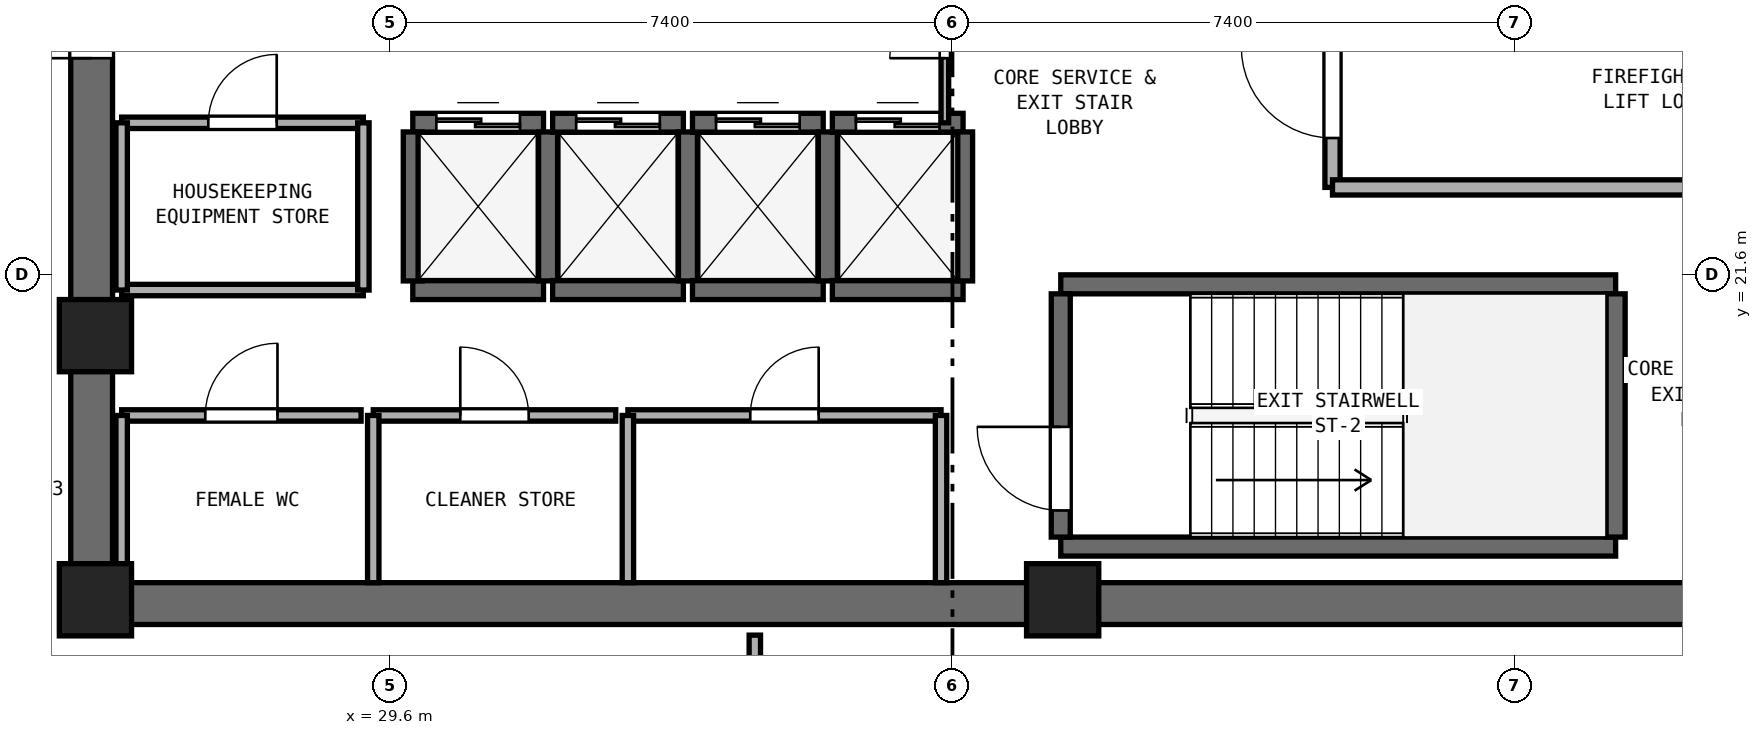
"""IFC4 building model, lengths in metres.
Left out: names, types, materials, properties, quantities, classifications, styles, units other than length and angle.
Written with IfcOpenShell. Run it as: python <this file> out.ifc"""

import sys

from ifc_helpers import new_model, si_unit, direction, frame, frame_2d, origin, origin_2d, place, context, subcontext, project, spatial, rectangle, extrude, element, fill, save


model = new_model("IFC4")
c1 = context("Model", 3, precision=1e-05, world=origin(), true_north=direction((0.0, 1.0)))
c2 = subcontext(c1, "Body", "Model", "MODEL_VIEW")
j1 = project(units=[si_unit("LENGTHUNIT", "METRE"), si_unit("PLANEANGLEUNIT", "RADIAN")], contexts=[c1])
p1 = place(None, origin())
s1 = spatial("IfcSite", under=j1, at=p1, CompositionType="ELEMENT")
p2 = place(p1, origin())
s2 = spatial("IfcBuilding", under=s1, at=p2, CompositionType="ELEMENT")
p3 = place(p2, frame((0.0, 0.0, 204.8)))
s3 = spatial("IfcBuildingStorey", under=s2, at=p3, CompositionType="ELEMENT", Elevation=204.8)
p4 = place(p3, frame((25.4, 17.275, 0.0), z_axis=(0.0, 0.0, 1.0), x_axis=(1.0, 0.0, 0.0)))
e1 = element("IfcWall", 1, at=p4, inside=s3, PredefinedType="SHEAR", context=c2, shape_type="SweptSolid", body=[
    extrude(rectangle(XDim=23.2, YDim=0.55, at=frame_2d((11.6, 0.0))), origin(), (0.0, 0.0, 1.0), 3.54),
])
p5 = place(p3, frame((25.675, 17.55, 0.0), z_axis=(0.0, 0.0, 1.0), x_axis=(0.0, 1.0, 0.0)))
e2 = element("IfcWall", 2, at=p5, inside=s3, PredefinedType="SHEAR", context=c2, shape_type="SweptSolid", body=[
    extrude(rectangle(XDim=15.3, YDim=0.55, at=frame_2d((7.65, 0.0))), origin(), (0.0, 0.0, 1.0), 3.54),
])
p6 = place(p5, frame((6.9, 0.0, 0.0)))
e3 = element("IfcOpeningElement", 3, at=p6, cuts=e2, PredefinedType="OPENING", context=c2, shape_type="SweptSolid", body=[
    extrude(rectangle(XDim=1.5, YDim=2.15, at=frame_2d((0.75, 1.075))), frame((0.0, 0.285, 0.0), z_axis=(0.0, -1.0, 0.0), x_axis=(1.0, 0.0, 0.0)), (0.0, 0.0, 1.0), 0.57),
])
for number, where, z_axis, x_axis in (
    (4, (25.725, 17.325, 0.0), (0.0, 0.0, 1.0), (1.0, 0.0, 0.0)),
    (5, (38.45, 17.325, 0.0), (0.0, 0.0, 1.0), (1.0, 0.0, 0.0)),
    (6, (25.725, 20.8, 0.0), (0.0, 0.0, 1.0), (1.0, 0.0, 0.0)),
):
    element("IfcColumn", number, at=place(p3, frame(where, z_axis=z_axis, x_axis=x_axis)), inside=s3, PredefinedType="PILASTER", context=c2, shape_type="SweptSolid", body=[
        extrude(rectangle(XDim=0.95, YDim=0.95, at=origin_2d()), origin(), (0.0, 0.0, 1.0), 3.8),
    ])
for number, where, z_axis, x_axis in (
    (7, (38.425, 18.025, 0.0), (0.0, 0.0, 1.0), (1.0, 0.0, 0.0)),
    (8, (38.425, 21.475, 0.0), (0.0, 0.0, 1.0), (1.0, 0.0, 0.0)),
):
    element("IfcWall", number, at=place(p3, frame(where, z_axis=z_axis, x_axis=x_axis)), inside=s3, PredefinedType="SHEAR", context=c2, shape_type="SweptSolid", body=[
        extrude(rectangle(XDim=7.3, YDim=0.25, at=frame_2d((3.65, 0.0))), origin(), (0.0, 0.0, 1.0), 3.54),
    ])
p7 = place(p3, frame((38.425, 18.15, 0.0), z_axis=(0.0, 0.0, 1.0), x_axis=(0.0, 1.0, 0.0)))
e9 = element("IfcWall", 9, at=p7, inside=s3, PredefinedType="SHEAR", context=c2, shape_type="SweptSolid", body=[
    extrude(rectangle(XDim=3.2, YDim=0.25, at=frame_2d((1.6, 0.0))), origin(), (0.0, 0.0, 1.0), 3.54),
])
p8 = place(p7, frame((0.35, 0.0, 0.0)))
e10 = element("IfcOpeningElement", 10, at=p8, cuts=e9, PredefinedType="OPENING", context=c2, shape_type="SweptSolid", body=[
    extrude(rectangle(XDim=1.1, YDim=2.15, at=frame_2d((0.55, 1.075))), frame((0.0, 0.135, 0.0), z_axis=(0.0, -1.0, 0.0), x_axis=(1.0, 0.0, 0.0)), (0.0, 0.0, 1.0), 0.27),
])
p9 = place(p3, frame((45.725, 18.15, 0.0), z_axis=(0.0, 0.0, 1.0), x_axis=(0.0, 1.0, 0.0)))
e11 = element("IfcWall", 11, at=p9, inside=s3, PredefinedType="SHEAR", context=c2, shape_type="SweptSolid", body=[
    extrude(rectangle(XDim=3.2, YDim=0.25, at=frame_2d((1.6, 0.0))), origin(), (0.0, 0.0, 1.0), 3.54),
])
p10 = place(p3, frame((29.9, 21.4, 0.0), z_axis=(0.0, 0.0, 1.0), x_axis=(1.0, 0.0, 0.0)))
e12 = element("IfcWall", 12, at=p10, inside=s3, PredefinedType="SHEAR", context=c2, shape_type="SweptSolid", body=[
    extrude(rectangle(XDim=1.72, YDim=0.25, at=frame_2d((0.86, 0.0))), origin(), (0.0, 0.0, 1.0), 3.54),
])
p11 = place(p3, frame((29.9, 23.6, 0.0), z_axis=(0.0, 0.0, 1.0), x_axis=(1.0, 0.0, 0.0)))
e13 = element("IfcWall", 13, at=p11, inside=s3, PredefinedType="SHEAR", context=c2, shape_type="SweptSolid", body=[
    extrude(rectangle(XDim=1.72, YDim=0.25, at=frame_2d((0.86, 0.0))), origin(), (0.0, 0.0, 1.0), 3.54),
])
p12 = place(p11, frame((0.31, 0.0, 0.0)))
e14 = element("IfcOpeningElement", 14, at=p12, cuts=e13, PredefinedType="OPENING", context=c2, shape_type="SweptSolid", body=[
    extrude(rectangle(XDim=1.1, YDim=2.15, at=frame_2d((0.55, 1.075))), frame((0.0, 0.135, 0.0), z_axis=(0.0, -1.0, 0.0), x_axis=(1.0, 0.0, 0.0)), (0.0, 0.0, 1.0), 0.27),
])
for number, where, z_axis, x_axis in (
    (15, (29.9, 21.52, 0.0), (0.0, 0.0, 1.0), (0.0, 1.0, 0.0)),
    (16, (31.68, 21.52, 0.0), (0.0, 0.0, 1.0), (0.0, 1.0, 0.0)),
):
    element("IfcWall", number, at=place(p3, frame(where, z_axis=z_axis, x_axis=x_axis)), inside=s3, PredefinedType="SHEAR", context=c2, shape_type="SweptSolid", body=[
        extrude(rectangle(XDim=1.96, YDim=0.25, at=frame_2d((0.98, 0.0))), origin(), (0.0, 0.0, 1.0), 3.54),
    ])
p13 = place(p3, frame((31.74, 21.4, 0.0), z_axis=(0.0, 0.0, 1.0), x_axis=(1.0, 0.0, 0.0)))
e17 = element("IfcWall", 17, at=p13, inside=s3, PredefinedType="SHEAR", context=c2, shape_type="SweptSolid", body=[
    extrude(rectangle(XDim=1.72, YDim=0.25, at=frame_2d((0.86, 0.0))), origin(), (0.0, 0.0, 1.0), 3.54),
])
p14 = place(p3, frame((31.74, 23.6, 0.0), z_axis=(0.0, 0.0, 1.0), x_axis=(1.0, 0.0, 0.0)))
e18 = element("IfcWall", 18, at=p14, inside=s3, PredefinedType="SHEAR", context=c2, shape_type="SweptSolid", body=[
    extrude(rectangle(XDim=1.72, YDim=0.25, at=frame_2d((0.86, 0.0))), origin(), (0.0, 0.0, 1.0), 3.54),
])
p15 = place(p14, frame((0.31, 0.0, 0.0)))
e19 = element("IfcOpeningElement", 19, at=p15, cuts=e18, PredefinedType="OPENING", context=c2, shape_type="SweptSolid", body=[
    extrude(rectangle(XDim=1.1, YDim=2.15, at=frame_2d((0.55, 1.075))), frame((0.0, 0.135, 0.0), z_axis=(0.0, -1.0, 0.0), x_axis=(1.0, 0.0, 0.0)), (0.0, 0.0, 1.0), 0.27),
])
p16 = place(p3, frame((33.52, 21.52, 0.0), z_axis=(0.0, 0.0, 1.0), x_axis=(0.0, 1.0, 0.0)))
e20 = element("IfcWall", 20, at=p16, inside=s3, PredefinedType="SHEAR", context=c2, shape_type="SweptSolid", body=[
    extrude(rectangle(XDim=1.96, YDim=0.25, at=frame_2d((0.98, 0.0))), origin(), (0.0, 0.0, 1.0), 3.54),
])
p17 = place(p3, frame((33.58, 21.4, 0.0), z_axis=(0.0, 0.0, 1.0), x_axis=(1.0, 0.0, 0.0)))
e21 = element("IfcWall", 21, at=p17, inside=s3, PredefinedType="SHEAR", context=c2, shape_type="SweptSolid", body=[
    extrude(rectangle(XDim=1.72, YDim=0.25, at=frame_2d((0.86, 0.0))), origin(), (0.0, 0.0, 1.0), 3.54),
])
p18 = place(p3, frame((33.58, 23.6, 0.0), z_axis=(0.0, 0.0, 1.0), x_axis=(1.0, 0.0, 0.0)))
e22 = element("IfcWall", 22, at=p18, inside=s3, PredefinedType="SHEAR", context=c2, shape_type="SweptSolid", body=[
    extrude(rectangle(XDim=1.72, YDim=0.25, at=frame_2d((0.86, 0.0))), origin(), (0.0, 0.0, 1.0), 3.54),
])
p19 = place(p18, frame((0.31, 0.0, 0.0)))
e23 = element("IfcOpeningElement", 23, at=p19, cuts=e22, PredefinedType="OPENING", context=c2, shape_type="SweptSolid", body=[
    extrude(rectangle(XDim=1.1, YDim=2.15, at=frame_2d((0.55, 1.075))), frame((0.0, 0.135, 0.0), z_axis=(0.0, -1.0, 0.0), x_axis=(1.0, 0.0, 0.0)), (0.0, 0.0, 1.0), 0.27),
])
p20 = place(p3, frame((35.36, 21.52, 0.0), z_axis=(0.0, 0.0, 1.0), x_axis=(0.0, 1.0, 0.0)))
e24 = element("IfcWall", 24, at=p20, inside=s3, PredefinedType="SHEAR", context=c2, shape_type="SweptSolid", body=[
    extrude(rectangle(XDim=1.96, YDim=0.25, at=frame_2d((0.98, 0.0))), origin(), (0.0, 0.0, 1.0), 3.54),
])
p21 = place(p3, frame((35.42, 21.4, 0.0), z_axis=(0.0, 0.0, 1.0), x_axis=(1.0, 0.0, 0.0)))
e25 = element("IfcWall", 25, at=p21, inside=s3, PredefinedType="SHEAR", context=c2, shape_type="SweptSolid", body=[
    extrude(rectangle(XDim=1.72, YDim=0.25, at=frame_2d((0.86, 0.0))), origin(), (0.0, 0.0, 1.0), 3.54),
])
p22 = place(p3, frame((35.42, 23.6, 0.0), z_axis=(0.0, 0.0, 1.0), x_axis=(1.0, 0.0, 0.0)))
e26 = element("IfcWall", 26, at=p22, inside=s3, PredefinedType="SHEAR", context=c2, shape_type="SweptSolid", body=[
    extrude(rectangle(XDim=1.72, YDim=0.25, at=frame_2d((0.86, 0.0))), origin(), (0.0, 0.0, 1.0), 3.54),
])
p23 = place(p22, frame((0.31, 0.0, 0.0)))
e27 = element("IfcOpeningElement", 27, at=p23, cuts=e26, PredefinedType="OPENING", context=c2, shape_type="SweptSolid", body=[
    extrude(rectangle(XDim=1.1, YDim=2.15, at=frame_2d((0.55, 1.075))), frame((0.0, 0.135, 0.0), z_axis=(0.0, -1.0, 0.0), x_axis=(1.0, 0.0, 0.0)), (0.0, 0.0, 1.0), 0.27),
])
p24 = place(p3, frame((37.14, 21.52, 0.0), z_axis=(0.0, 0.0, 1.0), x_axis=(0.0, 1.0, 0.0)))
e28 = element("IfcWall", 28, at=p24, inside=s3, PredefinedType="SHEAR", context=c2, shape_type="SweptSolid", body=[
    extrude(rectangle(XDim=1.96, YDim=0.25, at=frame_2d((0.98, 0.0))), origin(), (0.0, 0.0, 1.0), 3.54),
])
p25 = place(p3, frame((42.0, 22.75, 0.0), z_axis=(0.0, 0.0, 1.0), x_axis=(0.0, 1.0, 0.0)))
e29 = element("IfcWall", 29, at=p25, inside=s3, PredefinedType="SOLIDWALL", context=c2, shape_type="SweptSolid", body=[
    extrude(rectangle(XDim=6.05, YDim=0.2, at=frame_2d((3.025, 0.0))), origin(), (0.0, 0.0, 1.0), 3.54),
])
p26 = place(p25, frame((0.65, 0.0, 0.0)))
e30 = element("IfcOpeningElement", 30, at=p26, cuts=e29, PredefinedType="OPENING", context=c2, shape_type="SweptSolid", body=[
    extrude(rectangle(XDim=1.2, YDim=2.15, at=frame_2d((0.6, 1.075))), frame((0.0, 0.11, 0.0), z_axis=(0.0, -1.0, 0.0), x_axis=(1.0, 0.0, 0.0)), (0.0, 0.0, 1.0), 0.22),
])
p27 = place(p3, frame((42.0, 22.75, 0.0), z_axis=(0.0, 0.0, 1.0), x_axis=(1.0, 0.0, 0.0)))
e31 = element("IfcWall", 31, at=p27, inside=s3, PredefinedType="SOLIDWALL", context=c2, shape_type="SweptSolid", body=[
    extrude(rectangle(XDim=6.05, YDim=0.2, at=frame_2d((3.025, 0.0))), origin(), (0.0, 0.0, 1.0), 3.54),
])
p28 = place(p3, frame((26.07, 19.75, 0.0), z_axis=(0.0, 0.0, 1.0), x_axis=(1.0, 0.0, 0.0)))
e32 = element("IfcWall", 32, at=p28, inside=s3, PredefinedType="PARTITIONING", context=c2, shape_type="SweptSolid", body=[
    extrude(rectangle(XDim=3.15, YDim=0.15, at=frame_2d((1.575, 0.0))), origin(), (0.0, 0.0, 1.0), 3.54),
])
p29 = place(p28, frame((1.1, 0.0, 0.0)))
e33 = element("IfcOpeningElement", 33, at=p29, cuts=e32, PredefinedType="OPENING", context=c2, shape_type="SweptSolid", body=[
    extrude(rectangle(XDim=0.95, YDim=2.1, at=frame_2d((0.475, 1.05))), frame((0.0, 0.085, 0.0), z_axis=(0.0, -1.0, 0.0), x_axis=(1.0, 0.0, 0.0)), (0.0, 0.0, 1.0), 0.17),
])
p30 = place(p3, frame((26.07, 17.55, 0.0), z_axis=(0.0, 0.0, 1.0), x_axis=(0.0, 1.0, 0.0)))
e34 = element("IfcWall", 34, at=p30, inside=s3, PredefinedType="PARTITIONING", context=c2, shape_type="SweptSolid", body=[
    extrude(rectangle(XDim=2.2, YDim=0.15, at=frame_2d((1.1, 0.0))), origin(), (0.0, 0.0, 1.0), 2.64),
])
p31 = place(p3, frame((29.38, 19.75, 0.0), z_axis=(0.0, 0.0, 1.0), x_axis=(1.0, 0.0, 0.0)))
e35 = element("IfcWall", 35, at=p31, inside=s3, PredefinedType="PARTITIONING", context=c2, shape_type="SweptSolid", body=[
    extrude(rectangle(XDim=3.19, YDim=0.15, at=frame_2d((1.595, 0.0))), origin(), (0.0, 0.0, 1.0), 3.54),
])
p32 = place(p31, frame((1.145, 0.0, 0.0)))
e36 = element("IfcOpeningElement", 36, at=p32, cuts=e35, PredefinedType="OPENING", context=c2, shape_type="SweptSolid", body=[
    extrude(rectangle(XDim=0.9, YDim=2.1, at=frame_2d((0.45, 1.05))), frame((0.0, 0.085, 0.0), z_axis=(0.0, -1.0, 0.0), x_axis=(1.0, 0.0, 0.0)), (0.0, 0.0, 1.0), 0.17),
])
p33 = place(p3, frame((29.38, 17.55, 0.0), z_axis=(0.0, 0.0, 1.0), x_axis=(0.0, 1.0, 0.0)))
e37 = element("IfcWall", 37, at=p33, inside=s3, PredefinedType="PARTITIONING", context=c2, shape_type="SweptSolid", body=[
    extrude(rectangle(XDim=2.2, YDim=0.15, at=frame_2d((1.1, 0.0))), origin(), (0.0, 0.0, 1.0), 3.54),
])
p34 = place(p3, frame((32.73, 19.75, 0.0), z_axis=(0.0, 0.0, 1.0), x_axis=(1.0, 0.0, 0.0)))
e38 = element("IfcWall", 38, at=p34, inside=s3, PredefinedType="PARTITIONING", context=c2, shape_type="SweptSolid", body=[
    extrude(rectangle(XDim=4.12, YDim=0.15, at=frame_2d((2.06, 0.0))), origin(), (0.0, 0.0, 1.0), 3.54),
])
p35 = place(p34, frame((1.61, 0.0, 0.0)))
e39 = element("IfcOpeningElement", 39, at=p35, cuts=e38, PredefinedType="OPENING", context=c2, shape_type="SweptSolid", body=[
    extrude(rectangle(XDim=0.9, YDim=2.1, at=frame_2d((0.45, 1.05))), frame((0.0, 0.085, 0.0), z_axis=(0.0, -1.0, 0.0), x_axis=(1.0, 0.0, 0.0)), (0.0, 0.0, 1.0), 0.17),
])
for number, where, z_axis, x_axis in (
    (40, (32.73, 17.55, 0.0), (0.0, 0.0, 1.0), (0.0, 1.0, 0.0)),
    (41, (36.85, 17.55, 0.0), (0.0, 0.0, 1.0), (0.0, 1.0, 0.0)),
):
    element("IfcWall", number, at=place(p3, frame(where, z_axis=z_axis, x_axis=x_axis)), inside=s3, PredefinedType="PARTITIONING", context=c2, shape_type="SweptSolid", body=[
        extrude(rectangle(XDim=2.2, YDim=0.15, at=frame_2d((1.1, 0.0))), origin(), (0.0, 0.0, 1.0), 3.54),
    ])
p36 = place(p3, frame((26.07, 21.4, 0.0), z_axis=(0.0, 0.0, 1.0), x_axis=(1.0, 0.0, 0.0)))
e42 = element("IfcWall", 42, at=p36, inside=s3, PredefinedType="PARTITIONING", context=c2, shape_type="SweptSolid", body=[
    extrude(rectangle(XDim=3.18, YDim=0.15, at=frame_2d((1.59, 0.0))), origin(), (0.0, 0.0, 1.0), 3.54),
])
p37 = place(p3, frame((26.07, 23.6, 0.0), z_axis=(0.0, 0.0, 1.0), x_axis=(1.0, 0.0, 0.0)))
e43 = element("IfcWall", 43, at=p37, inside=s3, PredefinedType="PARTITIONING", context=c2, shape_type="SweptSolid", body=[
    extrude(rectangle(XDim=3.18, YDim=0.15, at=frame_2d((1.59, 0.0))), origin(), (0.0, 0.0, 1.0), 3.54),
])
p38 = place(p37, frame((1.14, 0.0, 0.0)))
e44 = element("IfcOpeningElement", 44, at=p38, cuts=e43, PredefinedType="OPENING", context=c2, shape_type="SweptSolid", body=[
    extrude(rectangle(XDim=0.9, YDim=2.1, at=frame_2d((0.45, 1.05))), frame((0.0, 0.085, 0.0), z_axis=(0.0, -1.0, 0.0), x_axis=(1.0, 0.0, 0.0)), (0.0, 0.0, 1.0), 0.17),
])
p39 = place(p3, frame((26.07, 21.4, 0.0), z_axis=(0.0, 0.0, 1.0), x_axis=(0.0, 1.0, 0.0)))
e45 = element("IfcWall", 45, at=p39, inside=s3, PredefinedType="PARTITIONING", context=c2, shape_type="SweptSolid", body=[
    extrude(rectangle(XDim=2.2, YDim=0.15, at=frame_2d((1.1, 0.0))), origin(), (0.0, 0.0, 1.0), 2.64),
])
p40 = place(p3, frame((29.25, 21.4, 0.0), z_axis=(0.0, 0.0, 1.0), x_axis=(0.0, 1.0, 0.0)))
e46 = element("IfcWall", 46, at=p40, inside=s3, PredefinedType="PARTITIONING", context=c2, shape_type="SweptSolid", body=[
    extrude(rectangle(XDim=2.2, YDim=0.15, at=frame_2d((1.1, 0.0))), origin(), (0.0, 0.0, 1.0), 3.54),
])
p41 = place(p3, frame((36.9, 23.6, 0.0), z_axis=(0.0, 0.0, 1.0), x_axis=(0.0, 1.0, 0.0)))
e47 = element("IfcWall", 47, at=p41, inside=s3, PredefinedType="PARTITIONING", context=c2, shape_type="SweptSolid", body=[
    extrude(rectangle(XDim=3.2, YDim=0.1, at=frame_2d((1.6, 0.0))), origin(), (0.0, 0.0, 1.0), 3.54),
])
p42 = place(p41, frame((0.85, 0.0, 0.0)))
e48 = element("IfcOpeningElement", 48, at=p42, cuts=e47, PredefinedType="OPENING", context=c2, shape_type="SweptSolid", body=[
    extrude(rectangle(XDim=1.45, YDim=2.12, at=frame_2d((0.725, 1.06))), frame((0.0, 0.06, 0.0), z_axis=(0.0, -1.0, 0.0), x_axis=(1.0, 0.0, 0.0)), (0.0, 0.0, 1.0), 0.12),
])
p43 = place(p3, frame((34.4, 15.35, 0.0), z_axis=(0.0, 0.0, 1.0), x_axis=(0.0, 1.0, 0.0)))
e49 = element("IfcWall", 49, at=p43, inside=s3, PredefinedType="PARTITIONING", context=c2, shape_type="SweptSolid", body=[
    extrude(rectangle(XDim=1.51, YDim=0.15, at=frame_2d((0.755, 0.0))), origin(), (0.0, 0.0, 1.0), 3.54),
])
p44 = place(p8, origin())
e50 = element("IfcDoor", 50, at=p44, inside=s3, OperationType="SINGLE_SWING_RIGHT", PredefinedType="DOOR", context=c2, shape_type="SweptSolid", body=[
    extrude(rectangle(XDim=1.1, YDim=2.15, at=frame_2d((0.55, 1.075))), frame((0.0, 0.025, 0.0), z_axis=(0.0, -1.0, 0.0), x_axis=(1.0, 0.0, 0.0)), (0.0, 0.0, 1.0), 0.05),
])
fill(e10, e50)
p45 = place(p12, origin())
e51 = element("IfcDoor", 51, at=p45, inside=s3, OperationType="DOUBLE_DOOR_SLIDING", PredefinedType="DOOR", context=c2, shape_type="SweptSolid", body=[
    extrude(rectangle(XDim=1.1, YDim=2.15, at=frame_2d((0.55, 1.075))), frame((0.0, 0.025, 0.0), z_axis=(0.0, -1.0, 0.0), x_axis=(1.0, 0.0, 0.0)), (0.0, 0.0, 1.0), 0.05),
])
fill(e14, e51)
p46 = place(p15, origin())
e52 = element("IfcDoor", 52, at=p46, inside=s3, OperationType="DOUBLE_DOOR_SLIDING", PredefinedType="DOOR", context=c2, shape_type="SweptSolid", body=[
    extrude(rectangle(XDim=1.1, YDim=2.15, at=frame_2d((0.55, 1.075))), frame((0.0, 0.025, 0.0), z_axis=(0.0, -1.0, 0.0), x_axis=(1.0, 0.0, 0.0)), (0.0, 0.0, 1.0), 0.05),
])
fill(e19, e52)
p47 = place(p19, origin())
e53 = element("IfcDoor", 53, at=p47, inside=s3, OperationType="DOUBLE_DOOR_SLIDING", PredefinedType="DOOR", context=c2, shape_type="SweptSolid", body=[
    extrude(rectangle(XDim=1.1, YDim=2.15, at=frame_2d((0.55, 1.075))), frame((0.0, 0.025, 0.0), z_axis=(0.0, -1.0, 0.0), x_axis=(1.0, 0.0, 0.0)), (0.0, 0.0, 1.0), 0.05),
])
fill(e23, e53)
p48 = place(p23, origin())
e54 = element("IfcDoor", 54, at=p48, inside=s3, OperationType="DOUBLE_DOOR_SLIDING", PredefinedType="DOOR", context=c2, shape_type="SweptSolid", body=[
    extrude(rectangle(XDim=1.1, YDim=2.15, at=frame_2d((0.55, 1.075))), frame((0.0, 0.025, 0.0), z_axis=(0.0, -1.0, 0.0), x_axis=(1.0, 0.0, 0.0)), (0.0, 0.0, 1.0), 0.05),
])
fill(e27, e54)
p49 = place(p26, origin())
e55 = element("IfcDoor", 55, at=p49, inside=s3, OperationType="SINGLE_SWING_RIGHT", PredefinedType="DOOR", context=c2, shape_type="SweptSolid", body=[
    extrude(rectangle(XDim=1.2, YDim=2.15, at=frame_2d((0.6, 1.075))), frame((0.0, 0.025, 0.0), z_axis=(0.0, -1.0, 0.0), x_axis=(1.0, 0.0, 0.0)), (0.0, 0.0, 1.0), 0.05),
])
fill(e30, e55)
p50 = place(p6, origin())
e56 = element("IfcDoor", 56, at=p50, inside=s3, OperationType="DOUBLE_DOOR_SINGLE_SWING", PredefinedType="DOOR", context=c2, shape_type="SweptSolid", body=[
    extrude(rectangle(XDim=1.5, YDim=2.15, at=frame_2d((0.75, 1.075))), frame((0.0, 0.025, 0.0), z_axis=(0.0, -1.0, 0.0), x_axis=(1.0, 0.0, 0.0)), (0.0, 0.0, 1.0), 0.05),
])
fill(e3, e56)
p51 = place(p29, origin())
e57 = element("IfcDoor", 57, at=p51, inside=s3, OperationType="SINGLE_SWING_RIGHT", PredefinedType="DOOR", context=c2, shape_type="SweptSolid", body=[
    extrude(rectangle(XDim=0.95, YDim=2.1, at=frame_2d((0.475, 1.05))), frame((0.0, 0.025, 0.0), z_axis=(0.0, -1.0, 0.0), x_axis=(1.0, 0.0, 0.0)), (0.0, 0.0, 1.0), 0.05),
])
fill(e33, e57)
p52 = place(p32, origin())
e58 = element("IfcDoor", 58, at=p52, inside=s3, OperationType="SINGLE_SWING_LEFT", PredefinedType="DOOR", context=c2, shape_type="SweptSolid", body=[
    extrude(rectangle(XDim=0.9, YDim=2.1, at=frame_2d((0.45, 1.05))), frame((0.0, 0.025, 0.0), z_axis=(0.0, -1.0, 0.0), x_axis=(1.0, 0.0, 0.0)), (0.0, 0.0, 1.0), 0.05),
])
fill(e36, e58)
p53 = place(p35, origin())
e59 = element("IfcDoor", 59, at=p53, inside=s3, OperationType="SINGLE_SWING_RIGHT", PredefinedType="DOOR", context=c2, shape_type="SweptSolid", body=[
    extrude(rectangle(XDim=0.9, YDim=2.1, at=frame_2d((0.45, 1.05))), frame((0.0, 0.025, 0.0), z_axis=(0.0, -1.0, 0.0), x_axis=(1.0, 0.0, 0.0)), (0.0, 0.0, 1.0), 0.05),
])
fill(e39, e59)
p54 = place(p38, origin())
e60 = element("IfcDoor", 60, at=p54, inside=s3, OperationType="SINGLE_SWING_RIGHT", PredefinedType="DOOR", context=c2, shape_type="SweptSolid", body=[
    extrude(rectangle(XDim=0.9, YDim=2.1, at=frame_2d((0.45, 1.05))), frame((0.0, 0.025, 0.0), z_axis=(0.0, -1.0, 0.0), x_axis=(1.0, 0.0, 0.0)), (0.0, 0.0, 1.0), 0.05),
])
fill(e44, e60)
p55 = place(p42, origin())
e61 = element("IfcDoor", 61, at=p55, inside=s3, OperationType="DOUBLE_DOOR_SINGLE_SWING", PredefinedType="DOOR", context=c2, shape_type="SweptSolid", body=[
    extrude(rectangle(XDim=1.45, YDim=2.12, at=frame_2d((0.725, 1.06))), frame((0.0, 0.025, 0.0), z_axis=(0.0, -1.0, 0.0), x_axis=(1.0, 0.0, 0.0)), (0.0, 0.0, 1.0), 0.05),
])
fill(e48, e61)
save(model, sys.argv[1])
